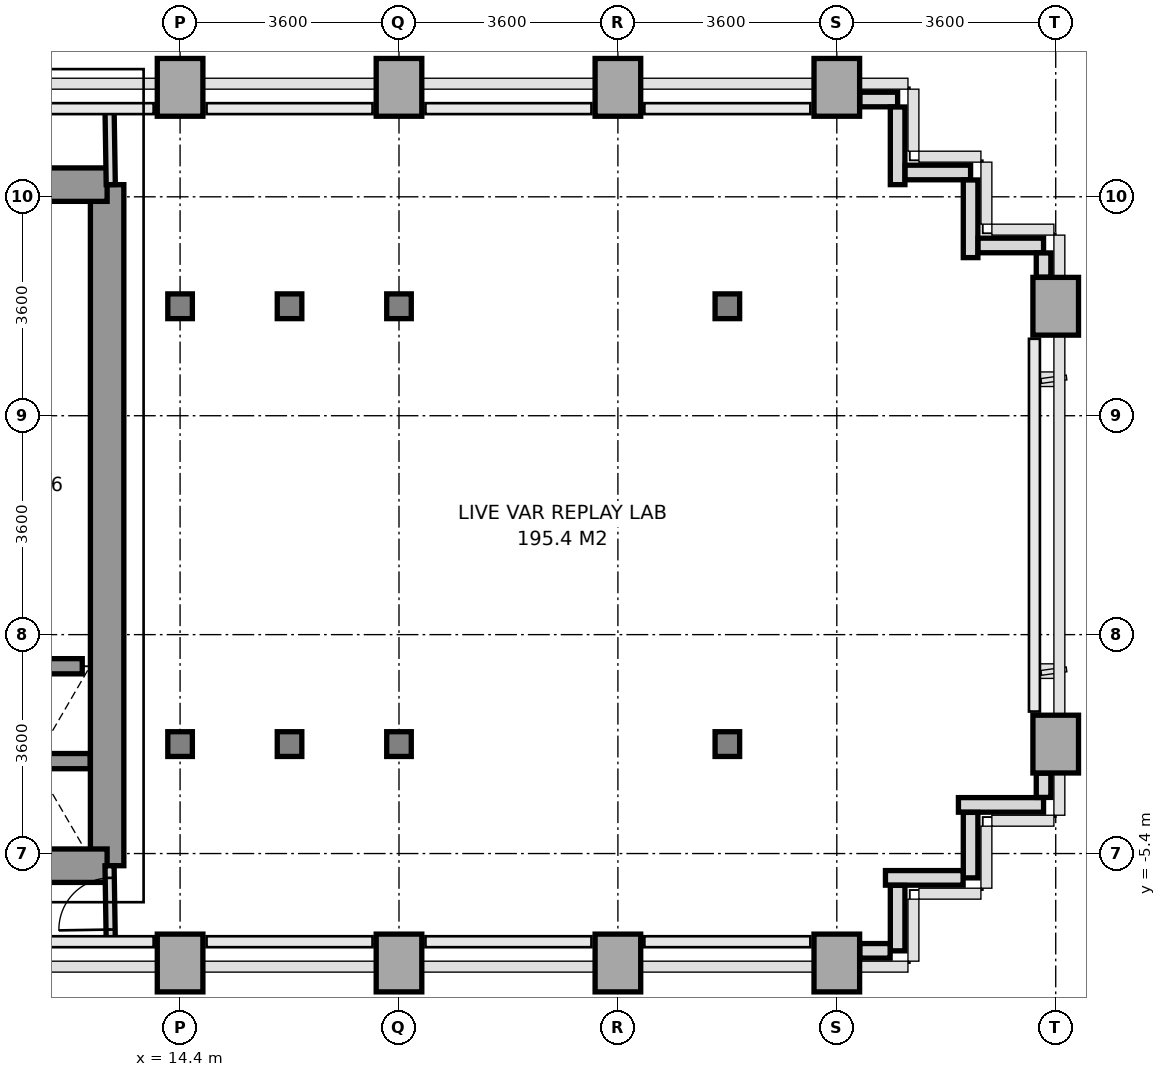
"""IFC4 building model, lengths in metres.
Left out: names, types, materials, properties, quantities, classifications, styles, units other than length and angle.
Written with IfcOpenShell. Run it as: python <this file> out.ifc"""

import sys

from ifc_helpers import new_model, si_unit, direction, frame, frame_2d, origin, origin_2d, place, context, subcontext, project, spatial, rectangle, i_section, extrude, source, transform, mapped, element, fill, save


model = new_model("IFC4")
c1 = context("Model", 3, precision=1e-05, world=origin(), true_north=direction((0.0, 1.0)))
c2 = subcontext(c1, "Body", "Model", "MODEL_VIEW")
j1 = project(units=[si_unit("LENGTHUNIT", "METRE"), si_unit("PLANEANGLEUNIT", "RADIAN")], contexts=[c1])
p1 = place(None, origin())
s1 = spatial("IfcSite", under=j1, at=p1, CompositionType="ELEMENT")
p2 = place(p1, origin())
s2 = spatial("IfcBuilding", under=s1, at=p2, CompositionType="ELEMENT")
p3 = place(p2, frame((0.0, 0.0, 71.4)))
s3 = spatial("IfcBuildingStorey", under=s2, at=p3, CompositionType="ELEMENT", Elevation=71.4)
m1 = source(origin(), c2, "Body", "SweptSolid", [
    extrude(rectangle(XDim=0.75, YDim=0.95, at=origin_2d()), origin(), (0.0, 0.0, 1.0), 3.2),
])
p4 = place(p3, frame((14.4, -7.2, 0.0), z_axis=(0.0, 0.0, 1.0), x_axis=(1.0, 0.0, 0.0)))
e1 = element("IfcColumn", 1, at=p4, inside=s3, PredefinedType="COLUMN", context=c2, shape_type="MappedRepresentation", body=[
    mapped(m1, transform((0.0, 0.0, 0.0), x_axis=(1.0, 0.0, 0.0), y_axis=(0.0, 1.0, 0.0), z_axis=(0.0, 0.0, 1.0), scale=1.0)),
])
m2 = source(origin(), c2, "Body", "SweptSolid", [
    extrude(i_section(OverallWidth=0.404, OverallDepth=0.407, WebThickness=0.022, FlangeThickness=0.035, at=origin_2d()), origin(), (0.0, 0.0, 1.0), 3.2),
])
for number, where, z_axis, x_axis in (
    (2, (14.4, -3.6, 0.0), (0.0, 0.0, 1.0), (1.0, 0.0, 0.0)),
    (3, (14.4, 3.6, 0.0), (0.0, 0.0, 1.0), (1.0, 0.0, 0.0)),
):
    element("IfcColumn", number, at=place(p3, frame(where, z_axis=z_axis, x_axis=x_axis)), inside=s3, PredefinedType="COLUMN", context=c2, shape_type="MappedRepresentation", body=[
        mapped(m2, transform((0.0, 0.0, 0.0), x_axis=(1.0, 0.0, 0.0), y_axis=(0.0, 1.0, 0.0), z_axis=(0.0, 0.0, 1.0), scale=1.0)),
    ])
p5 = place(p3, frame((14.4, 7.2, 0.0), z_axis=(0.0, 0.0, 1.0), x_axis=(1.0, 0.0, 0.0)))
e4 = element("IfcColumn", 4, at=p5, inside=s3, PredefinedType="COLUMN", context=c2, shape_type="MappedRepresentation", body=[
    mapped(m1, transform((0.0, 0.0, 0.0), x_axis=(1.0, 0.0, 0.0), y_axis=(0.0, 1.0, 0.0), z_axis=(0.0, 0.0, 1.0), scale=1.0)),
])
for number, where, z_axis, x_axis in (
    (5, (16.2, -3.6, 0.0), (0.0, 0.0, 1.0), (1.0, 0.0, 0.0)),
    (6, (16.2, 3.6, 0.0), (0.0, 0.0, 1.0), (1.0, 0.0, 0.0)),
):
    element("IfcColumn", number, at=place(p3, frame(where, z_axis=z_axis, x_axis=x_axis)), inside=s3, PredefinedType="COLUMN", context=c2, shape_type="MappedRepresentation", body=[
        mapped(m2, transform((0.0, 0.0, 0.0), x_axis=(1.0, 0.0, 0.0), y_axis=(0.0, 1.0, 0.0), z_axis=(0.0, 0.0, 1.0), scale=1.0)),
    ])
p6 = place(p3, frame((18.0, -7.2, 0.0), z_axis=(0.0, 0.0, 1.0), x_axis=(1.0, 0.0, 0.0)))
e7 = element("IfcColumn", 7, at=p6, inside=s3, PredefinedType="COLUMN", context=c2, shape_type="MappedRepresentation", body=[
    mapped(m1, transform((0.0, 0.0, 0.0), x_axis=(1.0, 0.0, 0.0), y_axis=(0.0, 1.0, 0.0), z_axis=(0.0, 0.0, 1.0), scale=1.0)),
])
for number, where, z_axis, x_axis in (
    (8, (18.0, -3.6, 0.0), (0.0, 0.0, 1.0), (1.0, 0.0, 0.0)),
    (9, (18.0, 3.6, 0.0), (0.0, 0.0, 1.0), (1.0, 0.0, 0.0)),
):
    element("IfcColumn", number, at=place(p3, frame(where, z_axis=z_axis, x_axis=x_axis)), inside=s3, PredefinedType="COLUMN", context=c2, shape_type="MappedRepresentation", body=[
        mapped(m2, transform((0.0, 0.0, 0.0), x_axis=(1.0, 0.0, 0.0), y_axis=(0.0, 1.0, 0.0), z_axis=(0.0, 0.0, 1.0), scale=1.0)),
    ])
for number, where, z_axis, x_axis in (
    (10, (18.0, 7.2, 0.0), (0.0, 0.0, 1.0), (1.0, 0.0, 0.0)),
    (11, (21.6, -7.2, 0.0), (0.0, 0.0, 1.0), (1.0, 0.0, 0.0)),
    (12, (21.6, 7.2, 0.0), (0.0, 0.0, 1.0), (1.0, 0.0, 0.0)),
):
    element("IfcColumn", number, at=place(p3, frame(where, z_axis=z_axis, x_axis=x_axis)), inside=s3, PredefinedType="COLUMN", context=c2, shape_type="MappedRepresentation", body=[
        mapped(m1, transform((0.0, 0.0, 0.0), x_axis=(1.0, 0.0, 0.0), y_axis=(0.0, 1.0, 0.0), z_axis=(0.0, 0.0, 1.0), scale=1.0)),
    ])
for number, where, z_axis, x_axis in (
    (13, (23.4, -3.6, 0.0), (0.0, 0.0, 1.0), (1.0, 0.0, 0.0)),
    (14, (23.4, 3.6, 0.0), (0.0, 0.0, 1.0), (1.0, 0.0, 0.0)),
):
    element("IfcColumn", number, at=place(p3, frame(where, z_axis=z_axis, x_axis=x_axis)), inside=s3, PredefinedType="COLUMN", context=c2, shape_type="MappedRepresentation", body=[
        mapped(m2, transform((0.0, 0.0, 0.0), x_axis=(1.0, 0.0, 0.0), y_axis=(0.0, 1.0, 0.0), z_axis=(0.0, 0.0, 1.0), scale=1.0)),
    ])
for number, where, z_axis, x_axis in (
    (15, (25.2, -7.2, 0.0), (0.0, 0.0, 1.0), (1.0, 0.0, 0.0)),
    (16, (25.2, 7.2, 0.0), (0.0, 0.0, 1.0), (1.0, 0.0, 0.0)),
    (17, (28.8, -3.6, 0.0), (0.0, 0.0, 1.0), (1.0, 0.0, 0.0)),
    (18, (28.8, 3.6, 0.0), (0.0, 0.0, 1.0), (1.0, 0.0, 0.0)),
):
    element("IfcColumn", number, at=place(p3, frame(where, z_axis=z_axis, x_axis=x_axis)), inside=s3, PredefinedType="COLUMN", context=c2, shape_type="MappedRepresentation", body=[
        mapped(m1, transform((0.0, 0.0, 0.0), x_axis=(1.0, 0.0, 0.0), y_axis=(0.0, 1.0, 0.0), z_axis=(0.0, 0.0, 1.0), scale=1.0)),
    ])
p7 = place(p3, frame((28.6, -4.6, 0.0), z_axis=(0.0, 0.0, 1.0), x_axis=(-1.0, 0.0, 0.0)))
e19 = element("IfcWall", 19, at=p7, inside=s3, PredefinedType="PARAPET", context=c2, shape_type="SweptSolid", body=[
    extrude(rectangle(XDim=1.4, YDim=0.24, at=frame_2d((0.7, 0.0))), origin(), (0.0, 0.0, 1.0), 1.15),
])
p8 = place(p3, frame((27.4, -4.723, 0.0), z_axis=(0.0, 0.0, 1.0), x_axis=(0.0, -1.0, 0.0)))
e20 = element("IfcWall", 20, at=p8, inside=s3, PredefinedType="PARAPET", context=c2, shape_type="SweptSolid", body=[
    extrude(rectangle(XDim=1.077, YDim=0.24, at=frame_2d((0.539, 0.0))), origin(), (0.0, 0.0, 1.0), 1.15),
])
p9 = place(p3, frame((27.277, -5.8, 0.0), z_axis=(0.0, 0.0, 1.0), x_axis=(-1.0, 0.0, 0.0)))
e21 = element("IfcWall", 21, at=p9, inside=s3, PredefinedType="PARAPET", context=c2, shape_type="SweptSolid", body=[
    extrude(rectangle(XDim=1.277, YDim=0.24, at=frame_2d((0.639, 0.0))), origin(), (0.0, 0.0, 1.0), 1.15),
])
p10 = place(p3, frame((26.2, -5.923, 0.0), z_axis=(0.0, 0.0, 1.0), x_axis=(0.0, -1.0, 0.0)))
e22 = element("IfcWall", 22, at=p10, inside=s3, PredefinedType="PARAPET", context=c2, shape_type="SweptSolid", body=[
    extrude(rectangle(XDim=1.077, YDim=0.24, at=frame_2d((0.539, 0.0))), origin(), (0.0, 0.0, 1.0), 1.15),
])
p11 = place(p3, frame((26.077, -7.0, 0.0), z_axis=(0.0, 0.0, 1.0), x_axis=(-1.0, 0.0, 0.0)))
e23 = element("IfcWall", 23, at=p11, inside=s3, PredefinedType="PARAPET", context=c2, shape_type="SweptSolid", body=[
    extrude(rectangle(XDim=0.499, YDim=0.24, at=frame_2d((0.25, 0.0))), origin(), (0.0, 0.0, 1.0), 1.15),
])
p12 = place(p3, frame((25.578, 7.0, 0.0), z_axis=(0.0, 0.0, 1.0), x_axis=(1.0, 0.0, 0.0)))
e24 = element("IfcWall", 24, at=p12, inside=s3, PredefinedType="PARAPET", context=c2, shape_type="SweptSolid", body=[
    extrude(rectangle(XDim=0.622, YDim=0.24, at=frame_2d((0.311, 0.0))), origin(), (0.0, 0.0, 1.0), 1.15),
])
p13 = place(p3, frame((26.2, 6.877, 0.0), z_axis=(0.0, 0.0, 1.0), x_axis=(0.0, -1.0, 0.0)))
e25 = element("IfcWall", 25, at=p13, inside=s3, PredefinedType="PARAPET", context=c2, shape_type="SweptSolid", body=[
    extrude(rectangle(XDim=1.277, YDim=0.24, at=frame_2d((0.638, 0.0))), origin(), (0.0, 0.0, 1.0), 1.15),
])
p14 = place(p3, frame((26.323, 5.8, 0.0), z_axis=(0.0, 0.0, 1.0), x_axis=(1.0, 0.0, 0.0)))
e26 = element("IfcWall", 26, at=p14, inside=s3, PredefinedType="PARAPET", context=c2, shape_type="SweptSolid", body=[
    extrude(rectangle(XDim=1.077, YDim=0.24, at=frame_2d((0.539, 0.0))), origin(), (0.0, 0.0, 1.0), 1.15),
])
p15 = place(p3, frame((27.4, 5.677, 0.0), z_axis=(0.0, 0.0, 1.0), x_axis=(0.0, -1.0, 0.0)))
e27 = element("IfcWall", 27, at=p15, inside=s3, PredefinedType="PARAPET", context=c2, shape_type="SweptSolid", body=[
    extrude(rectangle(XDim=1.277, YDim=0.24, at=frame_2d((0.639, 0.0))), origin(), (0.0, 0.0, 1.0), 1.15),
])
p16 = place(p3, frame((27.523, 4.6, 0.0), z_axis=(0.0, 0.0, 1.0), x_axis=(1.0, 0.0, 0.0)))
e28 = element("IfcWall", 28, at=p16, inside=s3, PredefinedType="PARAPET", context=c2, shape_type="SweptSolid", body=[
    extrude(rectangle(XDim=1.077, YDim=0.24, at=frame_2d((0.539, 0.0))), origin(), (0.0, 0.0, 1.0), 1.15),
])
for number, where, z_axis, x_axis in (
    (29, (28.6, 4.477, 0.0), (0.0, 0.0, 1.0), (0.0, -1.0, 0.0)),
    (30, (28.6, -4.078, 0.0), (0.0, 0.0, 1.0), (0.0, -1.0, 0.0)),
):
    element("IfcWall", number, at=place(p3, frame(where, z_axis=z_axis, x_axis=x_axis)), inside=s3, PredefinedType="PARAPET", context=c2, shape_type="SweptSolid", body=[
        extrude(rectangle(XDim=0.399, YDim=0.24, at=frame_2d((0.2, 0.0))), origin(), (0.0, 0.0, 1.0), 1.15),
    ])
p17 = place(p3, frame((13.2, -5.6, 0.0), z_axis=(0.0, 0.0, 1.0), x_axis=(0.0, 1.0, 0.0)))
e31 = element("IfcWall", 31, at=p17, inside=s3, PredefinedType="SHEAR", context=c2, shape_type="SweptSolid", body=[
    extrude(rectangle(XDim=11.2, YDim=0.55, at=frame_2d((5.6, 0.0))), origin(), (0.0, 0.0, 1.0), 3.2),
])
p18 = place(p3, frame((11.381, 5.6, 0.0), z_axis=(0.0, 0.0, 1.0), x_axis=(1.0, 0.0, 0.0)))
e32 = element("IfcWall", 32, at=p18, inside=s3, PredefinedType="SHEAR", context=c2, shape_type="SweptSolid", body=[
    extrude(rectangle(XDim=1.819, YDim=0.55, at=frame_2d((0.909, 0.0))), origin(), (0.0, 0.0, 1.0), 3.2),
])
p19 = place(p3, frame((5.4, -5.6, 0.0), z_axis=(0.0, 0.0, 1.0), x_axis=(1.0, 0.0, 0.0)))
e33 = element("IfcWall", 33, at=p19, inside=s3, PredefinedType="SHEAR", context=c2, shape_type="SweptSolid", body=[
    extrude(rectangle(XDim=7.8, YDim=0.55, at=frame_2d((3.9, 0.0))), origin(), (0.0, 0.0, 1.0), 3.2),
])
p20 = place(p19, frame((3.0, 0.0, 0.0)))
e34 = element("IfcOpeningElement", 34, at=p20, cuts=e33, PredefinedType="OPENING", context=c2, shape_type="SweptSolid", body=[
    extrude(rectangle(XDim=1.2, YDim=2.2, at=frame_2d((0.6, 1.1))), frame((0.0, 0.285, 0.0), z_axis=(0.0, -1.0, 0.0), x_axis=(1.0, 0.0, 0.0)), (0.0, 0.0, 1.0), 0.57),
])
p21 = place(p3, frame((11.08, -3.88, 0.0), z_axis=(0.0, 0.0, 1.0), x_axis=(1.0, 0.0, 0.0)))
e35 = element("IfcWall", 35, at=p21, inside=s3, PredefinedType="SOLIDWALL", context=c2, shape_type="SweptSolid", body=[
    extrude(rectangle(XDim=1.84, YDim=0.25, at=frame_2d((0.92, 0.0))), origin(), (0.0, 0.0, 1.0), 3.2),
])
p22 = place(p3, frame((11.209, -2.32, 0.0), z_axis=(0.0, 0.0, 1.0), x_axis=(1.0, 0.0, 0.0)))
e36 = element("IfcWall", 36, at=p22, inside=s3, PredefinedType="SOLIDWALL", context=c2, shape_type="SweptSolid", body=[
    extrude(rectangle(XDim=1.582, YDim=0.25, at=frame_2d((0.791, 0.0))), origin(), (0.0, 0.0, 1.0), 3.2),
])
p23 = place(p3, frame((13.26, 5.6, 0.0), z_axis=(0.0, 0.0, 1.0), x_axis=(-0.016013571389, 0.999871774545, 0.0)))
e37 = element("IfcWall", 37, at=p23, inside=s3, PredefinedType="PARTITIONING", context=c2, shape_type="SweptSolid", body=[
    extrude(rectangle(XDim=1.25, YDim=0.15, at=frame_2d((0.625, 0.0))), origin(), (0.0, 0.0, 1.0), 3.2),
])
p24 = place(p3, frame((13.26, -6.85, 0.0), z_axis=(0.0, 0.0, 1.0), x_axis=(-0.016013571389, 0.999871774545, 0.0)))
e38 = element("IfcWall", 38, at=p24, inside=s3, PredefinedType="PARTITIONING", context=c2, shape_type="SweptSolid", body=[
    extrude(rectangle(XDim=1.25, YDim=0.15, at=frame_2d((0.625, 0.0))), origin(), (0.0, 0.0, 1.0), 3.2),
])
p25 = place(p24, frame((0.2, 0.0, 0.0)))
e39 = element("IfcOpeningElement", 39, at=p25, cuts=e38, PredefinedType="OPENING", context=c2, shape_type="SweptSolid", body=[
    extrude(rectangle(XDim=0.85, YDim=2.1, at=frame_2d((0.425, 1.05))), frame((0.0, 0.085, 0.0), z_axis=(0.0, -1.0, 0.0), x_axis=(1.0, 0.0, 0.0)), (0.0, 0.0, 1.0), 0.17),
])
m3 = source(origin(), c2, "Body", "SweptSolid", [
    extrude(rectangle(XDim=0.85, YDim=2.1, at=frame_2d((0.425, 1.05))), frame((0.0, 0.025, 0.0), z_axis=(0.0, -1.0, 0.0), x_axis=(1.0, 0.0, 0.0)), (0.0, 0.0, 1.0), 0.05),
])
p26 = place(p25, origin())
e40 = element("IfcDoor", 40, at=p26, inside=s3, OperationType="SINGLE_SWING_LEFT", PredefinedType="DOOR", context=c2, shape_type="MappedRepresentation", body=[
    mapped(m3, transform((0.0, 0.0, 0.0), x_axis=(1.0, 0.0, 0.0), y_axis=(0.0, 1.0, 0.0), z_axis=(0.0, 0.0, 1.0), scale=1.0)),
])
fill(e39, e40)
save(model, sys.argv[1])
